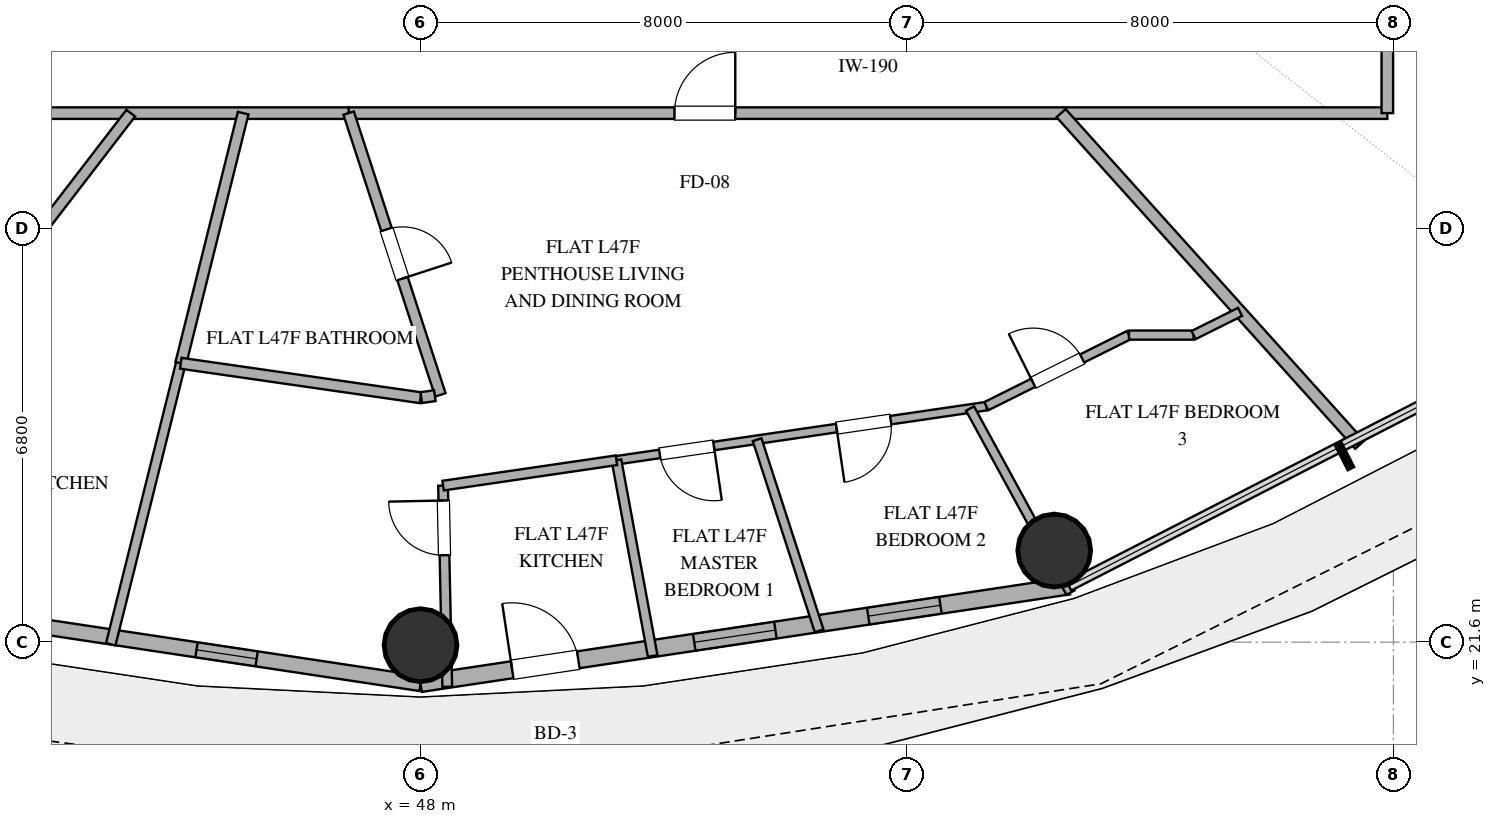
"""IFC4 building model, lengths in metres.
Left out: names, types, materials, properties, quantities, classifications, styles, units other than length and angle.
Written with IfcOpenShell. Run it as: python <this file> out.ifc"""

import sys

from ifc_helpers import new_model, si_unit, direction, frame, frame_2d, origin, origin_2d, place, context, subcontext, project, spatial, rectangle, hollow_circle, extrude, element, fill, save


model = new_model("IFC4")
c1 = context("Model", 3, precision=1e-05, world=origin(), true_north=direction((0.0, 1.0)))
c2 = subcontext(c1, "Body", "Model", "MODEL_VIEW")
j1 = project(units=[si_unit("LENGTHUNIT", "METRE"), si_unit("PLANEANGLEUNIT", "RADIAN")], contexts=[c1])
p1 = place(None, origin())
s1 = spatial("IfcSite", under=j1, at=p1, CompositionType="ELEMENT")
p2 = place(p1, origin())
s2 = spatial("IfcBuilding", under=s1, at=p2, CompositionType="ELEMENT")
p3 = place(p2, frame((0.0, 0.0, 186.6)))
s3 = spatial("IfcBuildingStorey", under=s2, at=p3, CompositionType="ELEMENT", Elevation=186.6)
for number, where, z_axis, x_axis in (
    (1, (48.0, 21.55, 0.0), (0.0, 0.0, 1.0), (1.0, 0.0, 0.0)),
    (2, (58.422, 23.107, 0.0), (0.0, 0.0, 1.0), (1.0, 0.0, 0.0)),
):
    element("IfcColumn", number, at=place(p3, frame(where, z_axis=z_axis, x_axis=x_axis)), inside=s3, PredefinedType="COLUMN", context=c2, shape_type="SweptSolid", body=[
        extrude(hollow_circle(Radius=0.6, WallThickness=0.032, at=origin_2d()), origin(), (0.0, 0.0, 1.0), 3.38),
    ])
p4 = place(p3, frame((37.337, 22.525, 0.0), z_axis=(0.0, 0.0, 1.0), x_axis=(0.988863993413, -0.148822049884, 0.0)))
e3 = element("IfcWall", 3, at=p4, inside=s3, PredefinedType="SOLIDWALL", context=c2, shape_type="SweptSolid", body=[
    extrude(rectangle(XDim=10.783, YDim=0.25, at=frame_2d((5.392, 0.0))), origin(), (0.0, 0.0, 1.0), 3.38),
])
p5 = place(p4, frame((7.056, 0.0, 1.42)))
e4 = element("IfcOpeningElement", 4, at=p5, cuts=e3, PredefinedType="OPENING", context=c2, shape_type="SweptSolid", body=[
    extrude(rectangle(XDim=1.0, YDim=1.05, at=frame_2d((0.5, 0.525))), frame((0.0, 0.135, 0.0), z_axis=(0.0, -1.0, 0.0), x_axis=(1.0, 0.0, 0.0)), (0.0, 0.0, 1.0), 0.27),
])
p6 = place(p3, frame((48.0, 20.92, 0.0), z_axis=(0.0, 0.0, 1.0), x_axis=(0.988863993413, 0.148822049884, 0.0)))
e5 = element("IfcWall", 5, at=p6, inside=s3, PredefinedType="SOLIDWALL", context=c2, shape_type="SweptSolid", body=[
    extrude(rectangle(XDim=10.783, YDim=0.28, at=frame_2d((5.392, 0.0))), origin(), (0.0, 0.0, 1.0), 3.38),
])
p7 = place(p6, frame((1.524, 0.0, 0.0)))
e6 = element("IfcOpeningElement", 6, at=p7, cuts=e5, PredefinedType="OPENING", context=c2, shape_type="SweptSolid", body=[
    extrude(rectangle(XDim=1.1, YDim=2.25, at=frame_2d((0.55, 1.125))), frame((0.0, 0.15, 0.0), z_axis=(0.0, -1.0, 0.0), x_axis=(1.0, 0.0, 0.0)), (0.0, 0.0, 1.0), 0.3),
])
p8 = place(p6, frame((4.552, 0.0, 0.85)))
e7 = element("IfcOpeningElement", 7, at=p8, cuts=e5, PredefinedType="OPENING", context=c2, shape_type="SweptSolid", body=[
    extrude(rectangle(XDim=1.35, YDim=1.8, at=frame_2d((0.675, 0.9))), frame((0.0, 0.15, 0.0), z_axis=(0.0, -1.0, 0.0), x_axis=(1.0, 0.0, 0.0)), (0.0, 0.0, 1.0), 0.3),
])
p9 = place(p6, frame((7.446, 0.0, 0.85)))
e8 = element("IfcOpeningElement", 8, at=p9, cuts=e5, PredefinedType="OPENING", context=c2, shape_type="SweptSolid", body=[
    extrude(rectangle(XDim=1.2, YDim=1.8, at=frame_2d((0.6, 0.9))), frame((0.0, 0.15, 0.0), z_axis=(0.0, -1.0, 0.0), x_axis=(1.0, 0.0, 0.0)), (0.0, 0.0, 1.0), 0.3),
])
p10 = place(p3, frame((46.818, 30.3, 0.0), z_axis=(0.0, 0.0, 1.0), x_axis=(1.0, 0.0, 0.0)))
e9 = element("IfcWall", 9, at=p10, inside=s3, PredefinedType="PARTITIONING", context=c2, shape_type="SweptSolid", body=[
    extrude(rectangle(XDim=17.082, YDim=0.19, at=frame_2d((8.541, 0.0))), origin(), (0.0, 0.0, 1.0), 2.74),
])
p11 = place(p10, frame((5.358, 0.0, 0.0)))
e10 = element("IfcOpeningElement", 10, at=p11, cuts=e9, PredefinedType="OPENING", context=c2, shape_type="SweptSolid", body=[
    extrude(rectangle(XDim=1.0, YDim=2.2, at=frame_2d((0.5, 1.1))), frame((0.0, 0.105, 0.0), z_axis=(0.0, -1.0, 0.0), x_axis=(1.0, 0.0, 0.0)), (0.0, 0.0, 1.0), 0.21),
])
p12 = place(p3, frame((63.9, 37.474, 0.0), z_axis=(0.0, 0.0, 1.0), x_axis=(0.0, -1.0, 0.0)))
e11 = element("IfcWall", 11, at=p12, inside=s3, PredefinedType="PARTITIONING", context=c2, shape_type="SweptSolid", body=[
    extrude(rectangle(XDim=7.174, YDim=0.19, at=frame_2d((3.587, 0.0))), origin(), (0.0, 0.0, 1.0), 2.74),
])
p13 = place(p12, frame((3.087, 0.0, 0.0)))
e12 = element("IfcOpeningElement", 12, at=p13, cuts=e11, PredefinedType="OPENING", context=c2, shape_type="SweptSolid", body=[
    extrude(rectangle(XDim=1.0, YDim=2.2, at=frame_2d((0.5, 1.1))), frame((0.0, 0.105, 0.0), z_axis=(0.0, -1.0, 0.0), x_axis=(1.0, 0.0, 0.0)), (0.0, 0.0, 1.0), 0.21),
])
p14 = place(p3, frame((46.818, 30.3, 0.0), z_axis=(0.0, 0.0, 1.0), x_axis=(-1.0, 0.0, 0.0)))
e13 = element("IfcWall", 13, at=p14, inside=s3, PredefinedType="PARTITIONING", context=c2, shape_type="SweptSolid", body=[
    extrude(rectangle(XDim=14.718, YDim=0.19, at=frame_2d((7.359, 0.0))), origin(), (0.0, 0.0, 1.0), 2.74),
])
p15 = place(p3, frame((39.646, 25.634, 0.0), z_axis=(0.0, 0.0, 1.0), x_axis=(0.609572446913, 0.792730365234, 0.0)))
e14 = element("IfcWall", 14, at=p15, inside=s3, PredefinedType="PLUMBINGWALL", context=c2, shape_type="SweptSolid", body=[
    extrude(rectangle(XDim=5.886, YDim=0.18, at=frame_2d((2.943, 0.0))), origin(), (0.0, 0.0, 1.0), 2.74),
])
p16 = place(p3, frame((46.818, 30.3, 0.0), z_axis=(0.0, 0.0, 1.0), x_axis=(0.309560761104, -0.950879663882, 0.0)))
e15 = element("IfcWall", 15, at=p16, inside=s3, PredefinedType="PLUMBINGWALL", context=c2, shape_type="SweptSolid", body=[
    extrude(rectangle(XDim=4.872, YDim=0.18, at=frame_2d((2.436, 0.0))), origin(), (0.0, 0.0, 1.0), 2.74),
])
p17 = place(p16, frame((2.011, 0.0, 0.0)))
e16 = element("IfcOpeningElement", 16, at=p17, cuts=e15, PredefinedType="OPENING", context=c2, shape_type="SweptSolid", body=[
    extrude(rectangle(XDim=0.85, YDim=2.1, at=frame_2d((0.425, 1.05))), frame((0.0, 0.1, 0.0), z_axis=(0.0, -1.0, 0.0), x_axis=(1.0, 0.0, 0.0)), (0.0, 0.0, 1.0), 0.2),
])
p18 = place(p3, frame((42.905, 21.566, 0.0), z_axis=(0.0, 0.0, 1.0), x_axis=(0.24192039409, 0.970296100643, 0.0)))
e17 = element("IfcWall", 17, at=p18, inside=s3, PredefinedType="PLUMBINGWALL", context=c2, shape_type="SweptSolid", body=[
    extrude(rectangle(XDim=4.762, YDim=0.16, at=frame_2d((2.381, 0.0))), origin(), (0.0, 0.0, 1.0), 2.74),
])
p19 = place(p3, frame((63.445, 24.846, 0.0), z_axis=(0.0, 0.0, 1.0), x_axis=(-0.669111750453, 0.743161802979, 0.0)))
e18 = element("IfcWall", 18, at=p19, inside=s3, PredefinedType="PARTITIONING", context=c2, shape_type="SweptSolid", body=[
    extrude(rectangle(XDim=7.339, YDim=0.2, at=frame_2d((3.669, 0.0))), origin(), (0.0, 0.0, 1.0), 2.74),
])
p20 = place(p3, frame((44.057, 26.187, 0.0), z_axis=(0.0, 0.0, 1.0), x_axis=(0.241939344098, 0.97029137571, 0.0)))
e19 = element("IfcWall", 19, at=p20, inside=s3, PredefinedType="PLUMBINGWALL", context=c2, shape_type="SweptSolid", body=[
    extrude(rectangle(XDim=4.239, YDim=0.18, at=frame_2d((2.12, 0.0))), origin(), (0.0, 0.0, 1.0), 2.74),
])
p21 = place(p3, frame((48.0, 25.62, 0.0), z_axis=(0.0, 0.0, 1.0), x_axis=(-0.989829001183, 0.14226225226, 0.0)))
e20 = element("IfcWall", 20, at=p21, inside=s3, PredefinedType="PLUMBINGWALL", context=c2, shape_type="SweptSolid", body=[
    extrude(rectangle(XDim=3.983, YDim=0.18, at=frame_2d((1.992, 0.0))), origin(), (0.0, 0.0, 1.0), 2.74),
])
p22 = place(p3, frame((57.305, 25.481, 0.0), z_axis=(0.0, 0.0, 1.0), x_axis=(-0.989473827462, -0.1447119372, 0.0)))
e21 = element("IfcWall", 21, at=p22, inside=s3, PredefinedType="PARTITIONING", context=c2, shape_type="SweptSolid", body=[
    extrude(rectangle(XDim=6.148, YDim=0.14, at=frame_2d((3.074, 0.0))), origin(), (0.0, 0.0, 1.0), 2.74),
])
p23 = place(p22, frame((1.59, 0.0, 0.0)))
e22 = element("IfcOpeningElement", 22, at=p23, cuts=e21, PredefinedType="OPENING", context=c2, shape_type="SweptSolid", body=[
    extrude(rectangle(XDim=0.9, YDim=2.1, at=frame_2d((0.45, 1.05))), frame((0.0, 0.08, 0.0), z_axis=(0.0, -1.0, 0.0), x_axis=(1.0, 0.0, 0.0)), (0.0, 0.0, 1.0), 0.16),
])
p24 = place(p22, frame((4.529, 0.0, 0.0)))
e23 = element("IfcOpeningElement", 23, at=p24, cuts=e21, PredefinedType="OPENING", context=c2, shape_type="SweptSolid", body=[
    extrude(rectangle(XDim=0.9, YDim=2.1, at=frame_2d((0.45, 1.05))), frame((0.0, 0.08, 0.0), z_axis=(0.0, -1.0, 0.0), x_axis=(1.0, 0.0, 0.0)), (0.0, 0.0, 1.0), 0.16),
])
p25 = place(p3, frame((57.037, 25.442, 0.0), z_axis=(0.0, 0.0, 1.0), x_axis=(0.479035633035, -0.877795455834, 0.0)))
e24 = element("IfcWall", 24, at=p25, inside=s3, PredefinedType="PARTITIONING", context=c2, shape_type="SweptSolid", body=[
    extrude(rectangle(XDim=3.449, YDim=0.15, at=frame_2d((1.724, 0.0))), origin(), (0.0, 0.0, 1.0), 2.74),
])
p26 = place(p3, frame((48.439, 20.866, 0.0), z_axis=(0.0, 0.0, 1.0), x_axis=(-0.020804233052, 0.999783568522, 0.0)))
e25 = element("IfcWall", 25, at=p26, inside=s3, PredefinedType="PLUMBINGWALL", context=c2, shape_type="SweptSolid", body=[
    extrude(rectangle(XDim=3.309, YDim=0.16, at=frame_2d((1.655, 0.0))), origin(), (0.0, 0.0, 1.0), 2.74),
])
p27 = place(p26, frame((2.165, 0.0, 0.0)))
e26 = element("IfcOpeningElement", 26, at=p27, cuts=e25, PredefinedType="OPENING", context=c2, shape_type="SweptSolid", body=[
    extrude(rectangle(XDim=0.9, YDim=2.1, at=frame_2d((0.45, 1.05))), frame((0.0, 0.09, 0.0), z_axis=(0.0, -1.0, 0.0), x_axis=(1.0, 0.0, 0.0)), (0.0, 0.0, 1.0), 0.18),
])
p28 = place(p3, frame((54.555, 21.787, 0.0), z_axis=(0.0, 0.0, 1.0), x_axis=(-0.308436028498, 0.951245087411, 0.0)))
e27 = element("IfcWall", 27, at=p28, inside=s3, PredefinedType="PARTITIONING", context=c2, shape_type="SweptSolid", body=[
    extrude(rectangle(XDim=3.304, YDim=0.15, at=frame_2d((1.652, 0.0))), origin(), (0.0, 0.0, 1.0), 2.74),
])
p29 = place(p3, frame((51.222, 24.591, 0.0), z_axis=(0.0, 0.0, 1.0), x_axis=(0.181950347297, -0.983307719444, 0.0)))
e28 = element("IfcWall", 28, at=p29, inside=s3, PredefinedType="PLUMBINGWALL", context=c2, shape_type="SweptSolid", body=[
    extrude(rectangle(XDim=3.273, YDim=0.16, at=frame_2d((1.636, 0.0))), origin(), (0.0, 0.0, 1.0), 2.74),
])
p30 = place(p3, frame((48.37, 24.174, 0.0), z_axis=(0.0, 0.0, 1.0), x_axis=(0.98947822579, 0.144681860256, 0.0)))
e29 = element("IfcWall", 29, at=p30, inside=s3, PredefinedType="PLUMBINGWALL", context=c2, shape_type="SweptSolid", body=[
    extrude(rectangle(XDim=2.882, YDim=0.16, at=frame_2d((1.441, 0.0))), origin(), (0.0, 0.0, 1.0), 2.74),
])
p31 = place(p3, frame((57.305, 25.481, 0.0), z_axis=(0.0, 0.0, 1.0), x_axis=(0.895041110332, 0.445983644112, 0.0)))
e30 = element("IfcWall", 30, at=p31, inside=s3, PredefinedType="PARTITIONING", context=c2, shape_type="SweptSolid", body=[
    extrude(rectangle(XDim=2.621, YDim=0.15, at=frame_2d((1.311, 0.0))), origin(), (0.0, 0.0, 1.0), 2.74),
])
p32 = place(p31, frame((0.861, 0.0, 0.0)))
e31 = element("IfcOpeningElement", 31, at=p32, cuts=e30, PredefinedType="OPENING", context=c2, shape_type="SweptSolid", body=[
    extrude(rectangle(XDim=0.9, YDim=2.1, at=frame_2d((0.45, 1.05))), frame((0.0, 0.085, 0.0), z_axis=(0.0, -1.0, 0.0), x_axis=(1.0, 0.0, 0.0)), (0.0, 0.0, 1.0), 0.17),
])
p33 = place(p3, frame((59.651, 26.65, 0.0), z_axis=(0.0, 0.0, 1.0), x_axis=(1.0, 0.0, 0.0)))
e32 = element("IfcWall", 32, at=p33, inside=s3, PredefinedType="PARTITIONING", context=c2, shape_type="SweptSolid", body=[
    extrude(rectangle(XDim=1.062, YDim=0.15, at=frame_2d((0.531, 0.0))), origin(), (0.0, 0.0, 1.0), 2.74),
])
p34 = place(p3, frame((60.713, 26.65, 0.0), z_axis=(0.0, 0.0, 1.0), x_axis=(0.894826947278, 0.446413188006, 0.0)))
e33 = element("IfcWall", 33, at=p34, inside=s3, PredefinedType="PARTITIONING", context=c2, shape_type="SweptSolid", body=[
    extrude(rectangle(XDim=0.854, YDim=0.15, at=frame_2d((0.427, 0.0))), origin(), (0.0, 0.0, 1.0), 2.74),
])
p35 = place(p3, frame((48.235, 25.654, 0.0), z_axis=(0.0, 0.0, 1.0), x_axis=(-0.989709601841, -0.143090544844, 0.0)))
e34 = element("IfcWall", 34, at=p35, inside=s3, PredefinedType="PLUMBINGWALL", context=c2, shape_type="SweptSolid", body=[
    extrude(rectangle(XDim=0.225, YDim=0.18, at=frame_2d((0.113, 0.0))), origin(), (0.0, 0.0, 1.0), 2.74),
])
p36 = place(p7, origin())
e35 = element("IfcDoor", 35, at=p36, inside=s3, OperationType="SINGLE_SWING_LEFT", PredefinedType="DOOR", context=c2, shape_type="SweptSolid", body=[
    extrude(rectangle(XDim=1.1, YDim=2.25, at=frame_2d((0.55, 1.125))), frame((0.0, 0.025, 0.0), z_axis=(0.0, -1.0, 0.0), x_axis=(1.0, 0.0, 0.0)), (0.0, 0.0, 1.0), 0.05),
])
fill(e6, e35)
p37 = place(p8, origin())
e36 = element("IfcWindow", 36, at=p37, inside=s3, PartitioningType="SINGLE_PANEL", PredefinedType="WINDOW", context=c2, shape_type="SweptSolid", body=[
    extrude(rectangle(XDim=1.35, YDim=1.8, at=frame_2d((0.675, 0.9))), frame((0.0, 0.03, 0.0), z_axis=(0.0, -1.0, 0.0), x_axis=(1.0, 0.0, 0.0)), (0.0, 0.0, 1.0), 0.06),
])
fill(e7, e36)
p38 = place(p9, origin())
e37 = element("IfcWindow", 37, at=p38, inside=s3, PartitioningType="SINGLE_PANEL", PredefinedType="WINDOW", context=c2, shape_type="SweptSolid", body=[
    extrude(rectangle(XDim=1.2, YDim=1.8, at=frame_2d((0.6, 0.9))), frame((0.0, 0.03, 0.0), z_axis=(0.0, -1.0, 0.0), x_axis=(1.0, 0.0, 0.0)), (0.0, 0.0, 1.0), 0.06),
])
fill(e8, e37)
p39 = place(p5, origin())
e38 = element("IfcWindow", 38, at=p39, inside=s3, PartitioningType="SINGLE_PANEL", PredefinedType="WINDOW", context=c2, shape_type="SweptSolid", body=[
    extrude(rectangle(XDim=1.0, YDim=1.05, at=frame_2d((0.5, 0.525))), frame((0.0, 0.03, 0.0), z_axis=(0.0, -1.0, 0.0), x_axis=(1.0, 0.0, 0.0)), (0.0, 0.0, 1.0), 0.06),
])
fill(e4, e38)
p40 = place(p11, origin())
e39 = element("IfcDoor", 39, at=p40, inside=s3, OperationType="SINGLE_SWING_RIGHT", PredefinedType="DOOR", context=c2, shape_type="SweptSolid", body=[
    extrude(rectangle(XDim=1.0, YDim=2.2, at=frame_2d((0.5, 1.1))), frame((0.0, 0.025, 0.0), z_axis=(0.0, -1.0, 0.0), x_axis=(1.0, 0.0, 0.0)), (0.0, 0.0, 1.0), 0.05),
])
fill(e10, e39)
p41 = place(p17, origin())
e40 = element("IfcDoor", 40, at=p41, inside=s3, OperationType="SINGLE_SWING_RIGHT", PredefinedType="DOOR", context=c2, shape_type="SweptSolid", body=[
    extrude(rectangle(XDim=0.85, YDim=2.1, at=frame_2d((0.425, 1.05))), frame((0.0, 0.025, 0.0), z_axis=(0.0, -1.0, 0.0), x_axis=(1.0, 0.0, 0.0)), (0.0, 0.0, 1.0), 0.05),
])
fill(e16, e40)
p42 = place(p23, origin())
e41 = element("IfcDoor", 41, at=p42, inside=s3, OperationType="SINGLE_SWING_RIGHT", PredefinedType="DOOR", context=c2, shape_type="SweptSolid", body=[
    extrude(rectangle(XDim=0.9, YDim=2.1, at=frame_2d((0.45, 1.05))), frame((0.0, 0.025, 0.0), z_axis=(0.0, -1.0, 0.0), x_axis=(1.0, 0.0, 0.0)), (0.0, 0.0, 1.0), 0.05),
])
fill(e22, e41)
p43 = place(p24, origin())
e42 = element("IfcDoor", 42, at=p43, inside=s3, OperationType="SINGLE_SWING_LEFT", PredefinedType="DOOR", context=c2, shape_type="SweptSolid", body=[
    extrude(rectangle(XDim=0.9, YDim=2.1, at=frame_2d((0.45, 1.05))), frame((0.0, 0.025, 0.0), z_axis=(0.0, -1.0, 0.0), x_axis=(1.0, 0.0, 0.0)), (0.0, 0.0, 1.0), 0.05),
])
fill(e23, e42)
p44 = place(p27, origin())
e43 = element("IfcDoor", 43, at=p44, inside=s3, OperationType="SINGLE_SWING_RIGHT", PredefinedType="DOOR", context=c2, shape_type="SweptSolid", body=[
    extrude(rectangle(XDim=0.9, YDim=2.1, at=frame_2d((0.45, 1.05))), frame((0.0, 0.025, 0.0), z_axis=(0.0, -1.0, 0.0), x_axis=(1.0, 0.0, 0.0)), (0.0, 0.0, 1.0), 0.05),
])
fill(e26, e43)
p45 = place(p32, origin())
e44 = element("IfcDoor", 44, at=p45, inside=s3, OperationType="SINGLE_SWING_LEFT", PredefinedType="DOOR", context=c2, shape_type="SweptSolid", body=[
    extrude(rectangle(XDim=0.9, YDim=2.1, at=frame_2d((0.45, 1.05))), frame((0.0, 0.025, 0.0), z_axis=(0.0, -1.0, 0.0), x_axis=(1.0, 0.0, 0.0)), (0.0, 0.0, 1.0), 0.05),
])
fill(e31, e44)
save(model, sys.argv[1])
